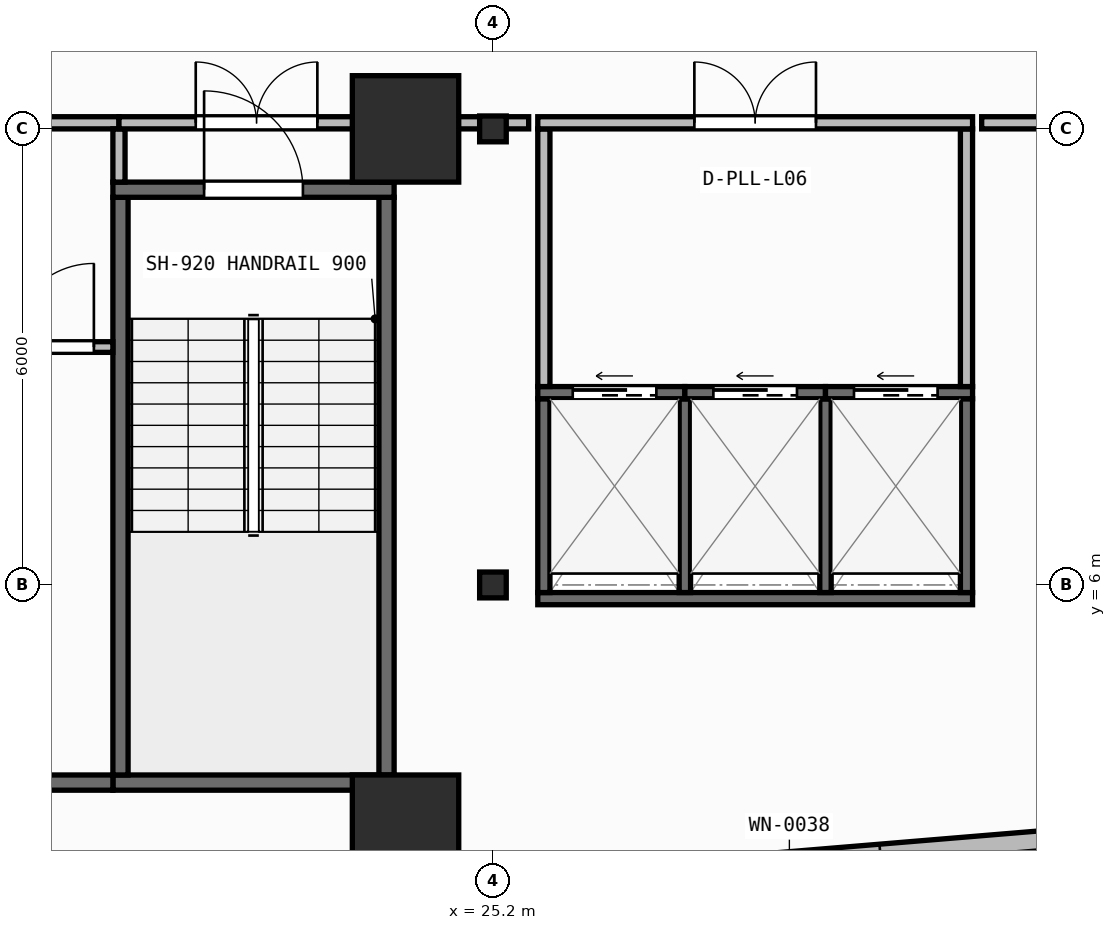
"""IFC4 building model, lengths in metres.
Left out: names, types, materials, properties, quantities, classifications, styles, units other than length and angle.
Written with IfcOpenShell. Run it as: python <this file> out.ifc"""

import sys

from ifc_helpers import new_model, si_unit, direction, frame, frame_2d, origin, origin_2d, place, context, subcontext, project, spatial, rectangle, i_section, extrude, element, fill, save


model = new_model("IFC4")
c1 = context("Model", 3, precision=1e-05, world=origin(), true_north=direction((0.0, 1.0)))
c2 = subcontext(c1, "Body", "Model", "MODEL_VIEW")
j1 = project(units=[si_unit("LENGTHUNIT", "METRE"), si_unit("PLANEANGLEUNIT", "RADIAN")], contexts=[c1])
p1 = place(None, origin())
s1 = spatial("IfcSite", under=j1, at=p1, CompositionType="ELEMENT")
p2 = place(p1, origin())
s2 = spatial("IfcBuilding", under=s1, at=p2, CompositionType="ELEMENT")
p3 = place(p2, frame((0.0, 0.0, 26.45)))
s3 = spatial("IfcBuildingStorey", under=s2, at=p3, CompositionType="ELEMENT", Elevation=26.45)
p4 = place(p3, frame((24.05, 2.8, 0.0), z_axis=(0.0, 0.0, 1.0), x_axis=(1.0, 0.0, 0.0)))
e1 = element("IfcColumn", 1, at=p4, inside=s3, PredefinedType="COLUMN", context=c2, shape_type="SweptSolid", body=[
    extrude(rectangle(XDim=1.4, YDim=1.4, at=origin_2d()), origin(), (0.0, 0.0, 1.0), 3.95),
])
p5 = place(p3, frame((25.2, 6.0, 0.0), z_axis=(0.0, 0.0, 1.0), x_axis=(1.0, 0.0, 0.0)))
e2 = element("IfcColumn", 2, at=p5, inside=s3, PredefinedType="COLUMN", context=c2, shape_type="SweptSolid", body=[
    extrude(i_section(OverallWidth=0.35, OverallDepth=0.34, WebThickness=0.016, FlangeThickness=0.028, at=origin_2d()), origin(), (0.0, 0.0, 1.0), 3.95),
])
p6 = place(p3, frame((24.05, 12.0, 0.0), z_axis=(0.0, 0.0, 1.0), x_axis=(1.0, 0.0, 0.0)))
e3 = element("IfcColumn", 3, at=p6, inside=s3, PredefinedType="COLUMN", context=c2, shape_type="SweptSolid", body=[
    extrude(rectangle(XDim=1.4, YDim=1.4, at=origin_2d()), origin(), (0.0, 0.0, 1.0), 3.95),
])
p7 = place(p3, frame((25.2, 12.0, 0.0), z_axis=(0.0, 0.0, 1.0), x_axis=(1.0, 0.0, 0.0)))
e4 = element("IfcColumn", 4, at=p7, inside=s3, PredefinedType="COLUMN", context=c2, shape_type="SweptSolid", body=[
    extrude(i_section(OverallWidth=0.35, OverallDepth=0.34, WebThickness=0.016, FlangeThickness=0.028, at=origin_2d()), origin(), (0.0, 0.0, 1.0), 3.95),
])
p8 = place(p3, frame((2.76, 0.174, 0.0), z_axis=(0.0, 0.0, 1.0), x_axis=(0.996571478456, 0.082736257641, 0.0)))
e5 = element("IfcWall", 5, at=p8, inside=s3, PredefinedType="STANDARD", context=c2, shape_type="SweptSolid", body=[
    extrude(rectangle(XDim=52.861, YDim=0.26, at=frame_2d((26.431, 0.0))), origin(), (0.0, 0.0, 1.0), 3.71),
])
p9 = place(p8, frame((25.231, 0.0, 0.9)))
e6 = element("IfcOpeningElement", 6, at=p9, cuts=e5, PredefinedType="OPENING", context=c2, shape_type="SweptSolid", body=[
    extrude(rectangle(XDim=2.4, YDim=1.65, at=frame_2d((1.2, 0.825))), frame((0.0, 0.14, 0.0), z_axis=(0.0, -1.0, 0.0), x_axis=(1.0, 0.0, 0.0)), (0.0, 0.0, 1.0), 0.28),
])
p10 = place(p3, frame((20.2, 3.4, 0.0), z_axis=(0.0, 0.0, 1.0), x_axis=(1.0, 0.0, 0.0)))
e7 = element("IfcWall", 7, at=p10, inside=s3, PredefinedType="SHEAR", context=c2, shape_type="SweptSolid", body=[
    extrude(rectangle(XDim=3.7, YDim=0.2, at=frame_2d((1.85, 0.0))), origin(), (0.0, 0.0, 1.0), 3.71),
])
for number, where, z_axis, x_axis in (
    (8, (20.3, 3.5, 0.0), (0.0, 0.0, 1.0), (0.0, 1.0, 0.0)),
    (9, (23.8, 3.5, 0.0), (0.0, 0.0, 1.0), (0.0, 1.0, 0.0)),
):
    element("IfcWall", number, at=place(p3, frame(where, z_axis=z_axis, x_axis=x_axis)), inside=s3, PredefinedType="SHEAR", context=c2, shape_type="SweptSolid", body=[
        extrude(rectangle(XDim=7.6, YDim=0.2, at=frame_2d((3.8, 0.0))), origin(), (0.0, 0.0, 1.0), 3.71),
    ])
p11 = place(p3, frame((20.2, 11.2, 0.0), z_axis=(0.0, 0.0, 1.0), x_axis=(1.0, 0.0, 0.0)))
e10 = element("IfcWall", 10, at=p11, inside=s3, PredefinedType="SHEAR", context=c2, shape_type="SweptSolid", body=[
    extrude(rectangle(XDim=3.7, YDim=0.2, at=frame_2d((1.85, 0.0))), origin(), (0.0, 0.0, 1.0), 3.71),
])
p12 = place(p11, frame((1.2, 0.0, 0.0)))
e11 = element("IfcOpeningElement", 11, at=p12, cuts=e10, PredefinedType="OPENING", context=c2, shape_type="SweptSolid", body=[
    extrude(rectangle(XDim=1.3, YDim=2.15, at=frame_2d((0.65, 1.075))), frame((0.0, 0.11, 0.0), z_axis=(0.0, -1.0, 0.0), x_axis=(1.0, 0.0, 0.0)), (0.0, 0.0, 1.0), 0.22),
])
p13 = place(p3, frame((6.5, 3.4, 0.0), z_axis=(0.0, 0.0, 1.0), x_axis=(1.0, 0.0, 0.0)))
e12 = element("IfcWall", 12, at=p13, inside=s3, PredefinedType="SHEAR", context=c2, shape_type="SweptSolid", body=[
    extrude(rectangle(XDim=13.7, YDim=0.2, at=frame_2d((6.85, 0.0))), origin(), (0.0, 0.0, 1.0), 3.71),
])
p14 = place(p3, frame((25.79, 5.82, 0.0), z_axis=(0.0, 0.0, 1.0), x_axis=(1.0, 0.0, 0.0)))
e13 = element("IfcWall", 13, at=p14, inside=s3, PredefinedType="SHEAR", context=c2, shape_type="SweptSolid", body=[
    extrude(rectangle(XDim=5.72, YDim=0.16, at=frame_2d((2.86, 0.0))), origin(), (0.0, 0.0, 1.0), 3.71),
])
for number, where, z_axis, x_axis in (
    (14, (25.87, 5.9, 0.0), (0.0, 0.0, 1.0), (0.0, 1.0, 0.0)),
    (15, (31.43, 5.9, 0.0), (0.0, 0.0, 1.0), (0.0, 1.0, 0.0)),
):
    element("IfcWall", number, at=place(p3, frame(where, z_axis=z_axis, x_axis=x_axis)), inside=s3, PredefinedType="SHEAR", context=c2, shape_type="SweptSolid", body=[
        extrude(rectangle(XDim=2.55, YDim=0.16, at=frame_2d((1.275, 0.0))), origin(), (0.0, 0.0, 1.0), 3.71),
    ])
for number, where, z_axis, x_axis in (
    (16, (27.725, 5.9, 0.0), (0.0, 0.0, 1.0), (0.0, 1.0, 0.0)),
    (17, (29.575, 5.9, 0.0), (0.0, 0.0, 1.0), (0.0, 1.0, 0.0)),
):
    element("IfcWall", number, at=place(p3, frame(where, z_axis=z_axis, x_axis=x_axis)), inside=s3, PredefinedType="SHEAR", context=c2, shape_type="SweptSolid", body=[
        extrude(rectangle(XDim=2.55, YDim=0.15, at=frame_2d((1.275, 0.0))), origin(), (0.0, 0.0, 1.0), 3.71),
    ])
p15 = place(p3, frame((25.79, 8.53, 0.0), z_axis=(0.0, 0.0, 1.0), x_axis=(1.0, 0.0, 0.0)))
e18 = element("IfcWall", 18, at=p15, inside=s3, PredefinedType="SHEAR", context=c2, shape_type="SweptSolid", body=[
    extrude(rectangle(XDim=1.935, YDim=0.16, at=frame_2d((0.968, 0.0))), origin(), (0.0, 0.0, 1.0), 3.71),
])
p16 = place(p15, frame((0.46, 0.0, 0.0)))
e19 = element("IfcOpeningElement", 19, at=p16, cuts=e18, PredefinedType="OPENING", context=c2, shape_type="SweptSolid", body=[
    extrude(rectangle(XDim=1.1, YDim=2.15, at=frame_2d((0.55, 1.075))), frame((0.0, 0.09, 0.0), z_axis=(0.0, -1.0, 0.0), x_axis=(1.0, 0.0, 0.0)), (0.0, 0.0, 1.0), 0.18),
])
p17 = place(p3, frame((27.725, 8.53, 0.0), z_axis=(0.0, 0.0, 1.0), x_axis=(1.0, 0.0, 0.0)))
e20 = element("IfcWall", 20, at=p17, inside=s3, PredefinedType="SHEAR", context=c2, shape_type="SweptSolid", body=[
    extrude(rectangle(XDim=1.85, YDim=0.16, at=frame_2d((0.925, 0.0))), origin(), (0.0, 0.0, 1.0), 3.71),
])
p18 = place(p17, frame((0.375, 0.0, 0.0)))
e21 = element("IfcOpeningElement", 21, at=p18, cuts=e20, PredefinedType="OPENING", context=c2, shape_type="SweptSolid", body=[
    extrude(rectangle(XDim=1.1, YDim=2.15, at=frame_2d((0.55, 1.075))), frame((0.0, 0.09, 0.0), z_axis=(0.0, -1.0, 0.0), x_axis=(1.0, 0.0, 0.0)), (0.0, 0.0, 1.0), 0.18),
])
p19 = place(p3, frame((29.575, 8.53, 0.0), z_axis=(0.0, 0.0, 1.0), x_axis=(1.0, 0.0, 0.0)))
e22 = element("IfcWall", 22, at=p19, inside=s3, PredefinedType="SHEAR", context=c2, shape_type="SweptSolid", body=[
    extrude(rectangle(XDim=1.935, YDim=0.16, at=frame_2d((0.968, 0.0))), origin(), (0.0, 0.0, 1.0), 3.71),
])
p20 = place(p19, frame((0.375, 0.0, 0.0)))
e23 = element("IfcOpeningElement", 23, at=p20, cuts=e22, PredefinedType="OPENING", context=c2, shape_type="SweptSolid", body=[
    extrude(rectangle(XDim=1.1, YDim=2.15, at=frame_2d((0.55, 1.075))), frame((0.0, 0.09, 0.0), z_axis=(0.0, -1.0, 0.0), x_axis=(1.0, 0.0, 0.0)), (0.0, 0.0, 1.0), 0.18),
])
p21 = place(p3, frame((18.61, 9.13, 0.0), z_axis=(0.0, 0.0, 1.0), x_axis=(1.0, 0.0, 0.0)))
e24 = element("IfcWall", 24, at=p21, inside=s3, PredefinedType="PARTITIONING", context=c2, shape_type="SweptSolid", body=[
    extrude(rectangle(XDim=1.59, YDim=0.14, at=frame_2d((0.795, 0.0))), origin(), (0.0, 0.0, 1.0), 3.71),
])
p22 = place(p21, frame((0.24, 0.0, 0.0)))
e25 = element("IfcOpeningElement", 25, at=p22, cuts=e24, PredefinedType="OPENING", context=c2, shape_type="SweptSolid", body=[
    extrude(rectangle(XDim=1.1, YDim=2.1, at=frame_2d((0.55, 1.05))), frame((0.0, 0.08, 0.0), z_axis=(0.0, -1.0, 0.0), x_axis=(1.0, 0.0, 0.0)), (0.0, 0.0, 1.0), 0.16),
])
p23 = place(p3, frame((12.58, 12.08, 0.0), z_axis=(0.0, 0.0, 1.0), x_axis=(1.0, 0.0, 0.0)))
e26 = element("IfcWall", 26, at=p23, inside=s3, PredefinedType="PARTITIONING", context=c2, shape_type="SweptSolid", body=[
    extrude(rectangle(XDim=7.7, YDim=0.16, at=frame_2d((3.85, 0.0))), origin(), (0.0, 0.0, 1.0), 3.073),
])
p24 = place(p23, frame((3.05, 0.0, 0.0)))
e27 = element("IfcOpeningElement", 27, at=p24, cuts=e26, PredefinedType="OPENING", context=c2, shape_type="SweptSolid", body=[
    extrude(rectangle(XDim=1.6, YDim=2.05, at=frame_2d((0.8, 1.025))), frame((0.0, 0.09, 0.0), z_axis=(0.0, -1.0, 0.0), x_axis=(1.0, 0.0, 0.0)), (0.0, 0.0, 1.0), 0.18),
])
p25 = place(p3, frame((20.28, 11.3, 0.0), z_axis=(0.0, 0.0, 1.0), x_axis=(0.0, 1.0, 0.0)))
e28 = element("IfcWall", 28, at=p25, inside=s3, PredefinedType="PARTITIONING", context=c2, shape_type="SweptSolid", body=[
    extrude(rectangle(XDim=0.7, YDim=0.16, at=frame_2d((0.35, 0.0))), origin(), (0.0, 0.0, 1.0), 3.71),
])
p26 = place(p3, frame((20.28, 12.08, 0.0), z_axis=(0.0, 0.0, 1.0), x_axis=(1.0, 0.0, 0.0)))
e29 = element("IfcWall", 29, at=p26, inside=s3, PredefinedType="PARTITIONING", context=c2, shape_type="SweptSolid", body=[
    extrude(rectangle(XDim=3.62, YDim=0.16, at=frame_2d((1.81, 0.0))), origin(), (0.0, 0.0, 1.0), 3.073),
])
p27 = place(p26, frame((1.01, 0.0, 0.0)))
e30 = element("IfcOpeningElement", 30, at=p27, cuts=e29, PredefinedType="OPENING", context=c2, shape_type="SweptSolid", body=[
    extrude(rectangle(XDim=1.6, YDim=2.05, at=frame_2d((0.8, 1.025))), frame((0.0, 0.09, 0.0), z_axis=(0.0, -1.0, 0.0), x_axis=(1.0, 0.0, 0.0)), (0.0, 0.0, 1.0), 0.18),
])
p28 = place(p3, frame((23.82, 11.3, 0.0), z_axis=(0.0, 0.0, 1.0), x_axis=(0.0, 1.0, 0.0)))
e31 = element("IfcWall", 31, at=p28, inside=s3, PredefinedType="PARTITIONING", context=c2, shape_type="SweptSolid", body=[
    extrude(rectangle(XDim=0.7, YDim=0.16, at=frame_2d((0.35, 0.0))), origin(), (0.0, 0.0, 1.0), 3.71),
])
for number, where, z_axis, x_axis in (
    (32, (25.87, 8.61, 0.0), (0.0, 0.0, 1.0), (0.0, 1.0, 0.0)),
    (33, (31.43, 8.61, 0.0), (0.0, 0.0, 1.0), (0.0, 1.0, 0.0)),
):
    element("IfcWall", number, at=place(p3, frame(where, z_axis=z_axis, x_axis=x_axis)), inside=s3, PredefinedType="PARTITIONING", context=c2, shape_type="SweptSolid", body=[
        extrude(rectangle(XDim=3.39, YDim=0.16, at=frame_2d((1.695, 0.0))), origin(), (0.0, 0.0, 1.0), 3.71),
    ])
p29 = place(p3, frame((25.79, 12.08, 0.0), z_axis=(0.0, 0.0, 1.0), x_axis=(1.0, 0.0, 0.0)))
e34 = element("IfcWall", 34, at=p29, inside=s3, PredefinedType="PARTITIONING", context=c2, shape_type="SweptSolid", body=[
    extrude(rectangle(XDim=5.72, YDim=0.16, at=frame_2d((2.86, 0.0))), origin(), (0.0, 0.0, 1.0), 3.073),
])
p30 = place(p29, frame((2.06, 0.0, 0.0)))
e35 = element("IfcOpeningElement", 35, at=p30, cuts=e34, PredefinedType="OPENING", context=c2, shape_type="SweptSolid", body=[
    extrude(rectangle(XDim=1.6, YDim=2.05, at=frame_2d((0.8, 1.025))), frame((0.0, 0.09, 0.0), z_axis=(0.0, -1.0, 0.0), x_axis=(1.0, 0.0, 0.0)), (0.0, 0.0, 1.0), 0.18),
])
p31 = place(p3, frame((24.02, 12.08, 0.0), z_axis=(0.0, 0.0, 1.0), x_axis=(1.0, 0.0, 0.0)))
e36 = element("IfcWall", 36, at=p31, inside=s3, PredefinedType="PARTITIONING", context=c2, shape_type="SweptSolid", body=[
    extrude(rectangle(XDim=1.65, YDim=0.16, at=frame_2d((0.825, 0.0))), origin(), (0.0, 0.0, 1.0), 3.073),
])
p32 = place(p3, frame((31.63, 12.08, 0.0), z_axis=(0.0, 0.0, 1.0), x_axis=(1.0, 0.0, 0.0)))
e37 = element("IfcWall", 37, at=p32, inside=s3, PredefinedType="PARTITIONING", context=c2, shape_type="SweptSolid", body=[
    extrude(rectangle(XDim=11.181, YDim=0.16, at=frame_2d((5.59, 0.0))), origin(), (0.0, 0.0, 1.0), 3.073),
])
p33 = place(p12, origin())
e38 = element("IfcDoor", 38, at=p33, inside=s3, OperationType="SINGLE_SWING_LEFT", PredefinedType="DOOR", context=c2, shape_type="SweptSolid", body=[
    extrude(rectangle(XDim=1.3, YDim=2.15, at=frame_2d((0.65, 1.075))), frame((0.0, 0.025, 0.0), z_axis=(0.0, -1.0, 0.0), x_axis=(1.0, 0.0, 0.0)), (0.0, 0.0, 1.0), 0.05),
])
fill(e11, e38)
p34 = place(p16, origin())
e39 = element("IfcDoor", 39, at=p34, inside=s3, OperationType="SLIDING_TO_LEFT", PredefinedType="DOOR", context=c2, shape_type="SweptSolid", body=[
    extrude(rectangle(XDim=1.1, YDim=2.15, at=frame_2d((0.55, 1.075))), frame((0.0, 0.025, 0.0), z_axis=(0.0, -1.0, 0.0), x_axis=(1.0, 0.0, 0.0)), (0.0, 0.0, 1.0), 0.05),
])
fill(e19, e39)
p35 = place(p18, origin())
e40 = element("IfcDoor", 40, at=p35, inside=s3, OperationType="SLIDING_TO_LEFT", PredefinedType="DOOR", context=c2, shape_type="SweptSolid", body=[
    extrude(rectangle(XDim=1.1, YDim=2.15, at=frame_2d((0.55, 1.075))), frame((0.0, 0.025, 0.0), z_axis=(0.0, -1.0, 0.0), x_axis=(1.0, 0.0, 0.0)), (0.0, 0.0, 1.0), 0.05),
])
fill(e21, e40)
p36 = place(p20, origin())
e41 = element("IfcDoor", 41, at=p36, inside=s3, OperationType="SLIDING_TO_LEFT", PredefinedType="DOOR", context=c2, shape_type="SweptSolid", body=[
    extrude(rectangle(XDim=1.1, YDim=2.15, at=frame_2d((0.55, 1.075))), frame((0.0, 0.025, 0.0), z_axis=(0.0, -1.0, 0.0), x_axis=(1.0, 0.0, 0.0)), (0.0, 0.0, 1.0), 0.05),
])
fill(e23, e41)
p37 = place(p22, origin())
e42 = element("IfcDoor", 42, at=p37, inside=s3, OperationType="SINGLE_SWING_RIGHT", PredefinedType="DOOR", context=c2, shape_type="SweptSolid", body=[
    extrude(rectangle(XDim=1.1, YDim=2.1, at=frame_2d((0.55, 1.05))), frame((0.0, 0.025, 0.0), z_axis=(0.0, -1.0, 0.0), x_axis=(1.0, 0.0, 0.0)), (0.0, 0.0, 1.0), 0.05),
])
fill(e25, e42)
p38 = place(p27, origin())
e43 = element("IfcDoor", 43, at=p38, inside=s3, OperationType="DOUBLE_DOOR_SINGLE_SWING", PredefinedType="DOOR", context=c2, shape_type="SweptSolid", body=[
    extrude(rectangle(XDim=1.6, YDim=2.05, at=frame_2d((0.8, 1.025))), frame((0.0, 0.025, 0.0), z_axis=(0.0, -1.0, 0.0), x_axis=(1.0, 0.0, 0.0)), (0.0, 0.0, 1.0), 0.05),
])
fill(e30, e43)
p39 = place(p30, origin())
e44 = element("IfcDoor", 44, at=p39, inside=s3, OperationType="DOUBLE_DOOR_SINGLE_SWING", PredefinedType="DOOR", context=c2, shape_type="SweptSolid", body=[
    extrude(rectangle(XDim=1.6, YDim=2.05, at=frame_2d((0.8, 1.025))), frame((0.0, 0.025, 0.0), z_axis=(0.0, -1.0, 0.0), x_axis=(1.0, 0.0, 0.0)), (0.0, 0.0, 1.0), 0.05),
])
fill(e35, e44)
save(model, sys.argv[1])
